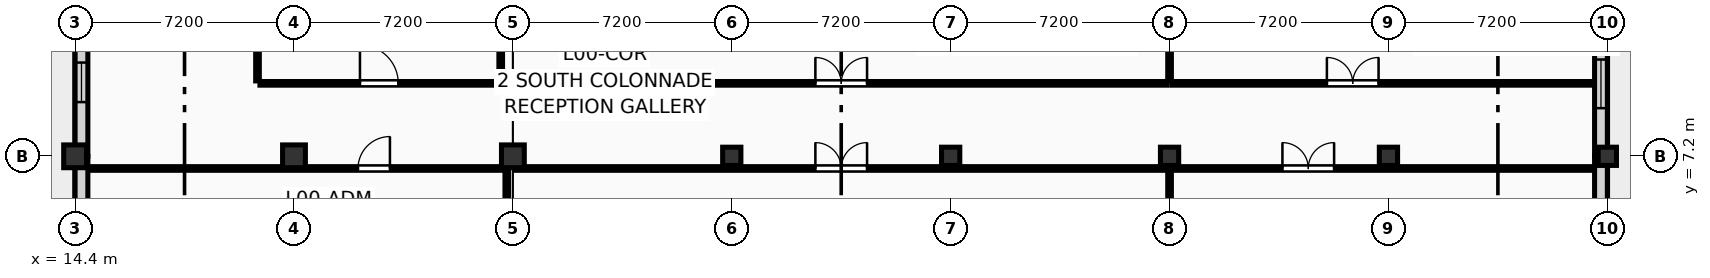
"""IFC4 building model, lengths in metres.
Left out: names, types, materials, properties, quantities, classifications, styles, units other than length and angle.
Written with IfcOpenShell. Run it as: python <this file> out.ifc"""

import sys

from ifc_helpers import new_model, si_unit, direction, frame, frame_2d, origin, origin_2d, place, context, subcontext, project, spatial, rectangle, extrude, element, fill, save


model = new_model("IFC4")
c1 = context("Model", 3, precision=1e-05, world=origin(), true_north=direction((0.0, 1.0)))
c2 = subcontext(c1, "Body", "Model", "MODEL_VIEW")
j1 = project(units=[si_unit("LENGTHUNIT", "METRE"), si_unit("PLANEANGLEUNIT", "RADIAN")], contexts=[c1])
p1 = place(None, origin())
s1 = spatial("IfcSite", under=j1, at=p1, CompositionType="ELEMENT")
p2 = place(p1, origin())
s2 = spatial("IfcBuilding", under=s1, at=p2, CompositionType="ELEMENT")
p3 = place(p2, origin())
s3 = spatial("IfcBuildingStorey", under=s2, at=p3, CompositionType="ELEMENT", Elevation=0.0)
for number, where, z_axis, x_axis in (
    (1, (14.4, 7.2, 0.0), (0.0, 0.0, 1.0), (1.0, 0.0, 0.0)),
    (2, (21.6, 7.2, 0.0), (0.0, 0.0, 1.0), (1.0, 0.0, 0.0)),
    (3, (28.8, 7.2, 0.0), (0.0, 0.0, 1.0), (1.0, 0.0, 0.0)),
):
    element("IfcColumn", number, at=place(p3, frame(where, z_axis=z_axis, x_axis=x_axis)), inside=s3, PredefinedType="COLUMN", context=c2, shape_type="SweptSolid", body=[
        extrude(rectangle(XDim=0.75, YDim=0.75, at=origin_2d()), origin(), (0.0, 0.0, 1.0), 4.5),
    ])
for number, where, z_axis, x_axis in (
    (4, (36.0, 7.2, 0.0), (0.0, 0.0, 1.0), (1.0, 0.0, 0.0)),
    (5, (43.2, 7.2, 0.0), (0.0, 0.0, 1.0), (1.0, 0.0, 0.0)),
    (6, (50.4, 7.2, 0.0), (0.0, 0.0, 1.0), (1.0, 0.0, 0.0)),
    (7, (57.6, 7.2, 0.0), (0.0, 0.0, 1.0), (1.0, 0.0, 0.0)),
    (8, (64.8, 7.2, 0.0), (0.0, 0.0, 1.0), (1.0, 0.0, 0.0)),
):
    element("IfcColumn", number, at=place(p3, frame(where, z_axis=z_axis, x_axis=x_axis)), inside=s3, PredefinedType="COLUMN", context=c2, shape_type="SweptSolid", body=[
        extrude(rectangle(XDim=0.6, YDim=0.6, at=origin_2d()), origin(), (0.0, 0.0, 1.0), 4.5),
    ])
p4 = place(p3, frame((64.59, 7.2, 0.0), z_axis=(0.0, 0.0, 1.0), x_axis=(0.0, 1.0, 0.0)))
e9 = element("IfcWall", 9, at=p4, inside=s3, PredefinedType="SOLIDWALL", context=c2, shape_type="SweptSolid", body=[
    extrude(rectangle(XDim=7.2, YDim=0.42, at=frame_2d((3.6, 0.0))), origin(), (0.0, 0.0, 1.0), 3.62),
])
p5 = place(p4, frame((1.583, 0.0, 0.45)))
e10 = element("IfcOpeningElement", 10, at=p5, cuts=e9, PredefinedType="OPENING", context=c2, shape_type="SweptSolid", body=[
    extrude(rectangle(XDim=1.6, YDim=2.65, at=frame_2d((0.8, 1.325))), frame((0.0, 0.222, 0.0), z_axis=(0.0, -1.0, 0.0), x_axis=(1.0, 0.0, 0.0)), (0.0, 0.0, 1.0), 0.444),
])
p6 = place(p4, frame((4.017, 0.0, 0.45)))
e11 = element("IfcOpeningElement", 11, at=p6, cuts=e9, PredefinedType="OPENING", context=c2, shape_type="SweptSolid", body=[
    extrude(rectangle(XDim=1.6, YDim=2.65, at=frame_2d((0.8, 1.325))), frame((0.0, 0.222, 0.0), z_axis=(0.0, -1.0, 0.0), x_axis=(1.0, 0.0, 0.0)), (0.0, 0.0, 1.0), 0.444),
])
p7 = place(p3, frame((64.59, 0.0, 0.0), z_axis=(0.0, 0.0, 1.0), x_axis=(0.0, 1.0, 0.0)))
e12 = element("IfcWall", 12, at=p7, inside=s3, PredefinedType="SOLIDWALL", context=c2, shape_type="SweptSolid", body=[
    extrude(rectangle(XDim=7.2, YDim=0.42, at=frame_2d((3.6, 0.0))), origin(), (0.0, 0.0, 1.0), 3.62),
])
p8 = place(p7, frame((1.65, 0.0, 0.45)))
e13 = element("IfcOpeningElement", 13, at=p8, cuts=e12, PredefinedType="OPENING", context=c2, shape_type="SweptSolid", body=[
    extrude(rectangle(XDim=1.5, YDim=2.6, at=frame_2d((0.75, 1.3))), frame((0.0, 0.222, 0.0), z_axis=(0.0, -1.0, 0.0), x_axis=(1.0, 0.0, 0.0)), (0.0, 0.0, 1.0), 0.444),
])
p9 = place(p7, frame((4.05, 0.0, 0.45)))
e14 = element("IfcOpeningElement", 14, at=p9, cuts=e12, PredefinedType="OPENING", context=c2, shape_type="SweptSolid", body=[
    extrude(rectangle(XDim=1.5, YDim=2.6, at=frame_2d((0.75, 1.3))), frame((0.0, 0.222, 0.0), z_axis=(0.0, -1.0, 0.0), x_axis=(1.0, 0.0, 0.0)), (0.0, 0.0, 1.0), 0.444),
])
p10 = place(p3, frame((14.61, 0.0, 0.0), z_axis=(0.0, 0.0, 1.0), x_axis=(0.0, 1.0, 0.0)))
e15 = element("IfcWall", 15, at=p10, inside=s3, PredefinedType="SOLIDWALL", context=c2, shape_type="SweptSolid", body=[
    extrude(rectangle(XDim=7.2, YDim=0.42, at=frame_2d((3.6, 0.0))), origin(), (0.0, 0.0, 1.0), 3.62),
])
p11 = place(p10, frame((1.717, 0.0, 0.45)))
e16 = element("IfcOpeningElement", 16, at=p11, cuts=e15, PredefinedType="OPENING", context=c2, shape_type="SweptSolid", body=[
    extrude(rectangle(XDim=1.4, YDim=2.38, at=frame_2d((0.7, 1.19))), frame((0.0, 0.222, 0.0), z_axis=(0.0, -1.0, 0.0), x_axis=(1.0, 0.0, 0.0)), (0.0, 0.0, 1.0), 0.444),
])
p12 = place(p10, frame((4.083, 0.0, 0.45)))
e17 = element("IfcOpeningElement", 17, at=p12, cuts=e15, PredefinedType="OPENING", context=c2, shape_type="SweptSolid", body=[
    extrude(rectangle(XDim=1.4, YDim=2.38, at=frame_2d((0.7, 1.19))), frame((0.0, 0.222, 0.0), z_axis=(0.0, -1.0, 0.0), x_axis=(1.0, 0.0, 0.0)), (0.0, 0.0, 1.0), 0.444),
])
p13 = place(p3, frame((14.61, 7.2, 0.0), z_axis=(0.0, 0.0, 1.0), x_axis=(0.0, 1.0, 0.0)))
e18 = element("IfcWall", 18, at=p13, inside=s3, PredefinedType="SOLIDWALL", context=c2, shape_type="SweptSolid", body=[
    extrude(rectangle(XDim=7.2, YDim=0.42, at=frame_2d((3.6, 0.0))), origin(), (0.0, 0.0, 1.0), 3.62),
])
p14 = place(p13, frame((1.783, 0.0, 0.45)))
e19 = element("IfcOpeningElement", 19, at=p14, cuts=e18, PredefinedType="OPENING", context=c2, shape_type="SweptSolid", body=[
    extrude(rectangle(XDim=1.3, YDim=2.35, at=frame_2d((0.65, 1.175))), frame((0.0, 0.222, 0.0), z_axis=(0.0, -1.0, 0.0), x_axis=(1.0, 0.0, 0.0)), (0.0, 0.0, 1.0), 0.444),
])
p15 = place(p13, frame((4.117, 0.0, 0.45)))
e20 = element("IfcOpeningElement", 20, at=p15, cuts=e18, PredefinedType="OPENING", context=c2, shape_type="SweptSolid", body=[
    extrude(rectangle(XDim=1.3, YDim=2.35, at=frame_2d((0.65, 1.175))), frame((0.0, 0.222, 0.0), z_axis=(0.0, -1.0, 0.0), x_axis=(1.0, 0.0, 0.0)), (0.0, 0.0, 1.0), 0.444),
])
p16 = place(p3, frame((28.6, 0.48, 0.0), z_axis=(0.0, 0.0, 1.0), x_axis=(0.0, 1.0, 0.0)))
e21 = element("IfcWall", 21, at=p16, inside=s3, PredefinedType="PARTITIONING", context=c2, shape_type="SweptSolid", body=[
    extrude(rectangle(XDim=6.24, YDim=0.12, at=frame_2d((3.12, 0.0))), origin(), (0.0, 0.0, 1.0), 3.385),
])
p17 = place(p3, frame((14.88, 6.8, 0.0), z_axis=(0.0, 0.0, 1.0), x_axis=(1.0, 0.0, 0.0)))
e22 = element("IfcWall", 22, at=p17, inside=s3, PredefinedType="PARTITIONING", context=c2, shape_type="SweptSolid", body=[
    extrude(rectangle(XDim=13.64, YDim=0.12, at=frame_2d((6.82, 0.0))), origin(), (0.0, 0.0, 1.0), 3.485),
])
p18 = place(p17, frame((8.826, 0.0, 0.0)))
e23 = element("IfcOpeningElement", 23, at=p18, cuts=e22, PredefinedType="OPENING", context=c2, shape_type="SweptSolid", body=[
    extrude(rectangle(XDim=1.05, YDim=2.18, at=frame_2d((0.525, 1.09))), frame((0.0, 0.072, 0.0), z_axis=(0.0, -1.0, 0.0), x_axis=(1.0, 0.0, 0.0)), (0.0, 0.0, 1.0), 0.144),
])
p19 = place(p3, frame((20.4, 9.68, 0.0), z_axis=(0.0, 0.0, 1.0), x_axis=(0.0, 1.0, 0.0)))
e24 = element("IfcWall", 24, at=p19, inside=s3, PredefinedType="PARTITIONING", context=c2, shape_type="SweptSolid", body=[
    extrude(rectangle(XDim=5.9, YDim=0.12, at=frame_2d((2.95, 0.0))), origin(), (0.0, 0.0, 1.0), 4.235),
])
p20 = place(p3, frame((20.48, 9.6, 0.0), z_axis=(0.0, 0.0, 1.0), x_axis=(1.0, 0.0, 0.0)))
e25 = element("IfcWall", 25, at=p20, inside=s3, PredefinedType="PARTITIONING", context=c2, shape_type="SweptSolid", body=[
    extrude(rectangle(XDim=7.84, YDim=0.12, at=frame_2d((3.92, 0.0))), origin(), (0.0, 0.0, 1.0), 4.235),
])
p21 = place(p20, frame((3.29, 0.0, 0.0)))
e26 = element("IfcOpeningElement", 26, at=p21, cuts=e25, PredefinedType="OPENING", context=c2, shape_type="SweptSolid", body=[
    extrude(rectangle(XDim=1.26, YDim=2.18, at=frame_2d((0.63, 1.09))), frame((0.0, 0.072, 0.0), z_axis=(0.0, -1.0, 0.0), x_axis=(1.0, 0.0, 0.0)), (0.0, 0.0, 1.0), 0.144),
])
p22 = place(p3, frame((28.4, 9.68, 0.0), z_axis=(0.0, 0.0, 1.0), x_axis=(0.0, 1.0, 0.0)))
e27 = element("IfcWall", 27, at=p22, inside=s3, PredefinedType="PARTITIONING", context=c2, shape_type="SweptSolid", body=[
    extrude(rectangle(XDim=4.72, YDim=0.12, at=frame_2d((2.36, 0.0))), origin(), (0.0, 0.0, 1.0), 3.385),
])
p23 = place(p3, frame((50.4, 0.48, 0.0), z_axis=(0.0, 0.0, 1.0), x_axis=(0.0, 1.0, 0.0)))
e28 = element("IfcWall", 28, at=p23, inside=s3, PredefinedType="PARTITIONING", context=c2, shape_type="SweptSolid", body=[
    extrude(rectangle(XDim=6.24, YDim=0.12, at=frame_2d((3.12, 0.0))), origin(), (0.0, 0.0, 1.0), 3.385),
])
p24 = place(p3, frame((28.88, 6.8, 0.0), z_axis=(0.0, 0.0, 1.0), x_axis=(1.0, 0.0, 0.0)))
e29 = element("IfcWall", 29, at=p24, inside=s3, PredefinedType="PARTITIONING", context=c2, shape_type="SweptSolid", body=[
    extrude(rectangle(XDim=21.44, YDim=0.12, at=frame_2d((10.72, 0.0))), origin(), (0.0, 0.0, 1.0), 3.485),
])
p25 = place(p24, frame((9.87, 0.0, 0.0)))
e30 = element("IfcOpeningElement", 30, at=p25, cuts=e29, PredefinedType="OPENING", context=c2, shape_type="SweptSolid", body=[
    extrude(rectangle(XDim=1.7, YDim=2.28, at=frame_2d((0.85, 1.14))), frame((0.0, 0.072, 0.0), z_axis=(0.0, -1.0, 0.0), x_axis=(1.0, 0.0, 0.0)), (0.0, 0.0, 1.0), 0.144),
])
p26 = place(p3, frame((28.88, 9.6, 0.0), z_axis=(0.0, 0.0, 1.0), x_axis=(1.0, 0.0, 0.0)))
e31 = element("IfcWall", 31, at=p26, inside=s3, PredefinedType="PARTITIONING", context=c2, shape_type="SweptSolid", body=[
    extrude(rectangle(XDim=21.44, YDim=0.12, at=frame_2d((10.72, 0.0))), origin(), (0.0, 0.0, 1.0), 4.235),
])
p27 = place(p26, frame((9.87, 0.0, 0.0)))
e32 = element("IfcOpeningElement", 32, at=p27, cuts=e31, PredefinedType="OPENING", context=c2, shape_type="SweptSolid", body=[
    extrude(rectangle(XDim=1.7, YDim=2.28, at=frame_2d((0.85, 1.14))), frame((0.0, 0.072, 0.0), z_axis=(0.0, -1.0, 0.0), x_axis=(1.0, 0.0, 0.0)), (0.0, 0.0, 1.0), 0.144),
])
p28 = place(p3, frame((50.4, 9.68, 0.0), z_axis=(0.0, 0.0, 1.0), x_axis=(0.0, 1.0, 0.0)))
e33 = element("IfcWall", 33, at=p28, inside=s3, PredefinedType="PARTITIONING", context=c2, shape_type="SweptSolid", body=[
    extrude(rectangle(XDim=4.24, YDim=0.12, at=frame_2d((2.12, 0.0))), origin(), (0.0, 0.0, 1.0), 3.385),
])
p29 = place(p3, frame((50.48, 6.8, 0.0), z_axis=(0.0, 0.0, 1.0), x_axis=(1.0, 0.0, 0.0)))
e34 = element("IfcWall", 34, at=p29, inside=s3, PredefinedType="PARTITIONING", context=c2, shape_type="SweptSolid", body=[
    extrude(rectangle(XDim=13.84, YDim=0.12, at=frame_2d((6.92, 0.0))), origin(), (0.0, 0.0, 1.0), 3.485),
])
p30 = place(p29, frame((3.633, 0.0, 0.0)))
e35 = element("IfcOpeningElement", 35, at=p30, cuts=e34, PredefinedType="OPENING", context=c2, shape_type="SweptSolid", body=[
    extrude(rectangle(XDim=1.7, YDim=2.28, at=frame_2d((0.85, 1.14))), frame((0.0, 0.072, 0.0), z_axis=(0.0, -1.0, 0.0), x_axis=(1.0, 0.0, 0.0)), (0.0, 0.0, 1.0), 0.144),
])
p31 = place(p3, frame((50.48, 9.6, 0.0), z_axis=(0.0, 0.0, 1.0), x_axis=(1.0, 0.0, 0.0)))
e36 = element("IfcWall", 36, at=p31, inside=s3, PredefinedType="PARTITIONING", context=c2, shape_type="SweptSolid", body=[
    extrude(rectangle(XDim=13.84, YDim=0.12, at=frame_2d((6.92, 0.0))), origin(), (0.0, 0.0, 1.0), 4.235),
])
p32 = place(p31, frame((5.095, 0.0, 0.0)))
e37 = element("IfcOpeningElement", 37, at=p32, cuts=e36, PredefinedType="OPENING", context=c2, shape_type="SweptSolid", body=[
    extrude(rectangle(XDim=1.7, YDim=2.28, at=frame_2d((0.85, 1.14))), frame((0.0, 0.072, 0.0), z_axis=(0.0, -1.0, 0.0), x_axis=(1.0, 0.0, 0.0)), (0.0, 0.0, 1.0), 0.144),
])
p33 = place(p5, origin())
e38 = element("IfcWindow", 38, at=p33, inside=s3, PartitioningType="SINGLE_PANEL", PredefinedType="WINDOW", context=c2, shape_type="SweptSolid", body=[
    extrude(rectangle(XDim=1.6, YDim=2.65, at=frame_2d((0.8, 1.325))), frame((0.0, 0.03, 0.0), z_axis=(0.0, -1.0, 0.0), x_axis=(1.0, 0.0, 0.0)), (0.0, 0.0, 1.0), 0.06),
])
fill(e10, e38)
p34 = place(p14, origin())
e39 = element("IfcWindow", 39, at=p34, inside=s3, PartitioningType="SINGLE_PANEL", PredefinedType="WINDOW", context=c2, shape_type="SweptSolid", body=[
    extrude(rectangle(XDim=1.3, YDim=2.35, at=frame_2d((0.65, 1.175))), frame((0.0, 0.03, 0.0), z_axis=(0.0, -1.0, 0.0), x_axis=(1.0, 0.0, 0.0)), (0.0, 0.0, 1.0), 0.06),
])
fill(e19, e39)
p35 = place(p18, origin())
e40 = element("IfcDoor", 40, at=p35, inside=s3, OperationType="SINGLE_SWING_RIGHT", PredefinedType="DOOR", context=c2, shape_type="SweptSolid", body=[
    extrude(rectangle(XDim=1.05, YDim=2.18, at=frame_2d((0.525, 1.09))), frame((0.0, 0.025, 0.0), z_axis=(0.0, -1.0, 0.0), x_axis=(1.0, 0.0, 0.0)), (0.0, 0.0, 1.0), 0.05),
])
fill(e23, e40)
p36 = place(p21, origin())
e41 = element("IfcDoor", 41, at=p36, inside=s3, OperationType="SINGLE_SWING_LEFT", PredefinedType="DOOR", context=c2, shape_type="SweptSolid", body=[
    extrude(rectangle(XDim=1.26, YDim=2.18, at=frame_2d((0.63, 1.09))), frame((0.0, 0.025, 0.0), z_axis=(0.0, -1.0, 0.0), x_axis=(1.0, 0.0, 0.0)), (0.0, 0.0, 1.0), 0.05),
])
fill(e26, e41)
p37 = place(p25, origin())
e42 = element("IfcDoor", 42, at=p37, inside=s3, OperationType="DOUBLE_DOOR_SINGLE_SWING", PredefinedType="DOOR", context=c2, shape_type="SweptSolid", body=[
    extrude(rectangle(XDim=1.7, YDim=2.28, at=frame_2d((0.85, 1.14))), frame((0.0, 0.025, 0.0), z_axis=(0.0, -1.0, 0.0), x_axis=(1.0, 0.0, 0.0)), (0.0, 0.0, 1.0), 0.05),
])
fill(e30, e42)
p38 = place(p27, origin())
e43 = element("IfcDoor", 43, at=p38, inside=s3, OperationType="DOUBLE_DOOR_SINGLE_SWING", PredefinedType="DOOR", context=c2, shape_type="SweptSolid", body=[
    extrude(rectangle(XDim=1.7, YDim=2.28, at=frame_2d((0.85, 1.14))), frame((0.0, 0.025, 0.0), z_axis=(0.0, -1.0, 0.0), x_axis=(1.0, 0.0, 0.0)), (0.0, 0.0, 1.0), 0.05),
])
fill(e32, e43)
p39 = place(p30, origin())
e44 = element("IfcDoor", 44, at=p39, inside=s3, OperationType="DOUBLE_DOOR_SINGLE_SWING", PredefinedType="DOOR", context=c2, shape_type="SweptSolid", body=[
    extrude(rectangle(XDim=1.7, YDim=2.28, at=frame_2d((0.85, 1.14))), frame((0.0, 0.025, 0.0), z_axis=(0.0, -1.0, 0.0), x_axis=(1.0, 0.0, 0.0)), (0.0, 0.0, 1.0), 0.05),
])
fill(e35, e44)
p40 = place(p32, origin())
e45 = element("IfcDoor", 45, at=p40, inside=s3, OperationType="DOUBLE_DOOR_SINGLE_SWING", PredefinedType="DOOR", context=c2, shape_type="SweptSolid", body=[
    extrude(rectangle(XDim=1.7, YDim=2.28, at=frame_2d((0.85, 1.14))), frame((0.0, 0.025, 0.0), z_axis=(0.0, -1.0, 0.0), x_axis=(1.0, 0.0, 0.0)), (0.0, 0.0, 1.0), 0.05),
])
fill(e37, e45)
save(model, sys.argv[1])
